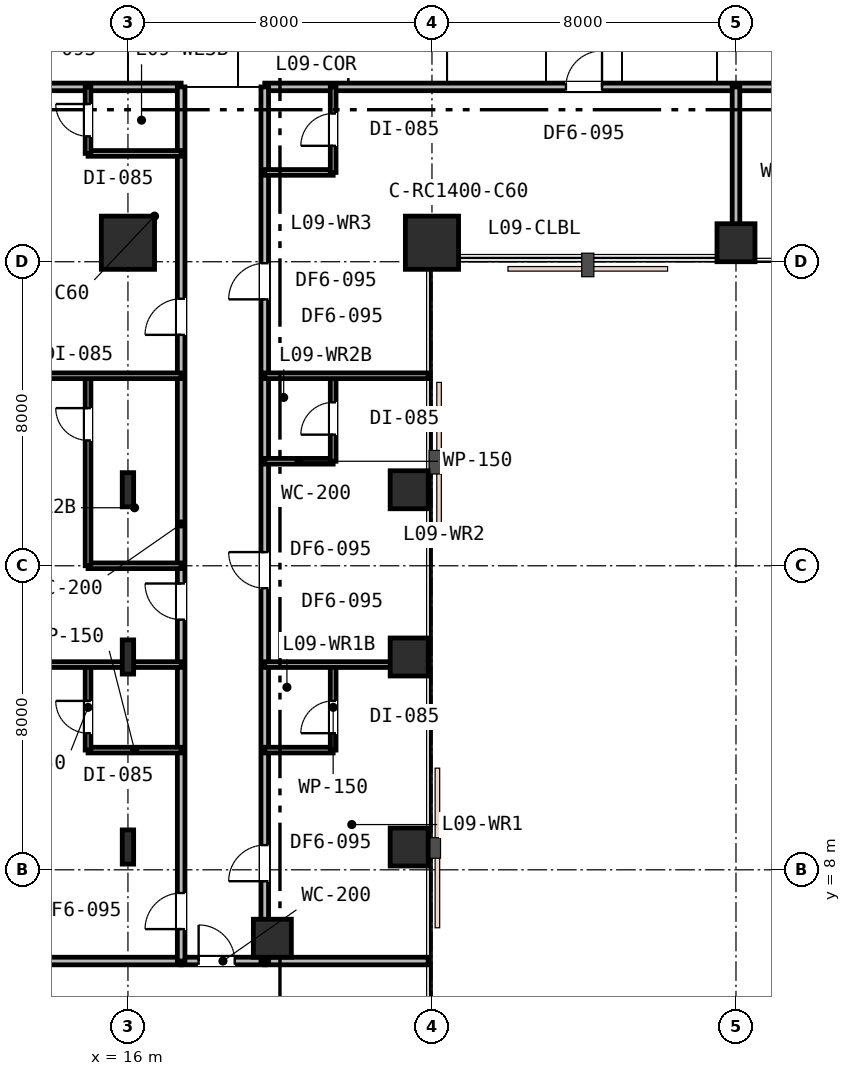
"""IFC4 building model, lengths in metres.
Left out: names, types, materials, properties, quantities, classifications, styles, units other than length and angle.
Written with IfcOpenShell. Run it as: python <this file> out.ifc"""

import sys

from ifc_helpers import new_model, si_unit, direction, frame, frame_2d, origin, origin_2d, place, context, subcontext, project, spatial, rectangle, i_section, extrude, element, fill, save


model = new_model("IFC4")
c1 = context("Model", 3, precision=1e-05, world=origin(), true_north=direction((0.0, 1.0)))
c2 = subcontext(c1, "Body", "Model", "MODEL_VIEW")
j1 = project(units=[si_unit("LENGTHUNIT", "METRE"), si_unit("PLANEANGLEUNIT", "RADIAN")], contexts=[c1])
p1 = place(None, origin())
s1 = spatial("IfcSite", under=j1, at=p1, CompositionType="ELEMENT")
p2 = place(p1, origin())
s2 = spatial("IfcBuilding", under=s1, at=p2, CompositionType="ELEMENT")
p3 = place(p2, frame((0.0, 0.0, 40.2)))
s3 = spatial("IfcBuildingStorey", under=s2, at=p3, CompositionType="ELEMENT", Elevation=40.2)
for number, where, z_axis, x_axis in (
    (1, (16.0, 24.5, 0.0), (0.0, 0.0, 1.0), (1.0, 0.0, 0.0)),
    (2, (24.0, 24.5, 0.0), (0.0, 0.0, 1.0), (1.0, 0.0, 0.0)),
):
    element("IfcColumn", number, at=place(p3, frame(where, z_axis=z_axis, x_axis=x_axis)), inside=s3, PredefinedType="COLUMN", context=c2, shape_type="SweptSolid", body=[
        extrude(rectangle(XDim=1.4, YDim=1.4, at=origin_2d()), origin(), (0.0, 0.0, 1.0), 3.6),
    ])
for number, where, z_axis, x_axis in (
    (3, (32.0, 24.5, 0.0), (0.0, 0.0, 1.0), (1.0, 0.0, 0.0)),
    (4, (19.8, 6.2, 0.0), (0.0, 0.0, 1.0), (1.0, 0.0, 0.0)),
    (5, (23.4, 8.6, 0.0), (0.0, 0.0, 1.0), (1.0, 0.0, 0.0)),
    (6, (23.4, 13.6, 0.0), (0.0, 0.0, 1.0), (1.0, 0.0, 0.0)),
    (7, (23.4, 18.0, 0.0), (0.0, 0.0, 1.0), (1.0, 0.0, 0.0)),
):
    element("IfcColumn", number, at=place(p3, frame(where, z_axis=z_axis, x_axis=x_axis)), inside=s3, PredefinedType="COLUMN", context=c2, shape_type="SweptSolid", body=[
        extrude(rectangle(XDim=1.0, YDim=1.0, at=origin_2d()), origin(), (0.0, 0.0, 1.0), 3.6),
    ])
for number, where, z_axis, x_axis in (
    (8, (16.0, 8.6, 0.0), (0.0, 0.0, 1.0), (1.0, 0.0, 0.0)),
    (9, (16.0, 13.6, 0.0), (0.0, 0.0, 1.0), (1.0, 0.0, 0.0)),
    (10, (16.0, 18.0, 0.0), (0.0, 0.0, 1.0), (1.0, 0.0, 0.0)),
):
    element("IfcColumn", number, at=place(p3, frame(where, z_axis=z_axis, x_axis=x_axis)), inside=s3, PredefinedType="COLUMN", context=c2, shape_type="SweptSolid", body=[
        extrude(i_section(OverallWidth=0.3, OverallDepth=0.9, WebThickness=0.018, FlangeThickness=0.035, FilletRadius=0.03, at=origin_2d()), origin(), (0.0, 0.0, 1.0), 3.6),
    ])
p4 = place(p3, frame((0.1, 28.6, 0.0), z_axis=(0.0, 0.0, 1.0), x_axis=(1.0, 0.0, 0.0)))
e11 = element("IfcWall", 11, at=p4, inside=s3, PredefinedType="PARTITIONING", context=c2, shape_type="SweptSolid", body=[
    extrude(rectangle(XDim=17.3, YDim=0.2, at=frame_2d((8.65, 0.0))), origin(), (0.0, 0.0, 1.0), 2.82),
])
p5 = place(p3, frame((19.6, 28.6, 0.0), z_axis=(0.0, 0.0, 1.0), x_axis=(1.0, 0.0, 0.0)))
e12 = element("IfcWall", 12, at=p5, inside=s3, PredefinedType="PARTITIONING", context=c2, shape_type="SweptSolid", body=[
    extrude(rectangle(XDim=30.8, YDim=0.2, at=frame_2d((15.4, 0.0))), origin(), (0.0, 0.0, 1.0), 2.82),
])
p6 = place(p5, frame((7.925, 0.0, 0.0)))
e13 = element("IfcOpeningElement", 13, at=p6, cuts=e12, PredefinedType="OPENING", context=c2, shape_type="SweptSolid", body=[
    extrude(rectangle(XDim=0.95, YDim=2.15, at=frame_2d((0.475, 1.075))), frame((0.0, 0.11, 0.0), z_axis=(0.0, -1.0, 0.0), x_axis=(1.0, 0.0, 0.0)), (0.0, 0.0, 1.0), 0.22),
])
p7 = place(p5, frame((16.39, 0.0, 0.0)))
e14 = element("IfcOpeningElement", 14, at=p7, cuts=e12, PredefinedType="OPENING", context=c2, shape_type="SweptSolid", body=[
    extrude(rectangle(XDim=0.95, YDim=2.15, at=frame_2d((0.475, 1.075))), frame((0.0, 0.11, 0.0), z_axis=(0.0, -1.0, 0.0), x_axis=(1.0, 0.0, 0.0)), (0.0, 0.0, 1.0), 0.22),
])
p8 = place(p5, frame((26.835, 0.0, 0.0)))
e15 = element("IfcOpeningElement", 15, at=p8, cuts=e12, PredefinedType="OPENING", context=c2, shape_type="SweptSolid", body=[
    extrude(rectangle(XDim=0.95, YDim=2.15, at=frame_2d((0.475, 1.075))), frame((0.0, 0.11, 0.0), z_axis=(0.0, -1.0, 0.0), x_axis=(1.0, 0.0, 0.0)), (0.0, 0.0, 1.0), 0.22),
])
p9 = place(p3, frame((32.0, 24.1, 0.0), z_axis=(0.0, 0.0, 1.0), x_axis=(0.0, 1.0, 0.0)))
e16 = element("IfcWall", 16, at=p9, inside=s3, PredefinedType="PARTITIONING", context=c2, shape_type="SweptSolid", body=[
    extrude(rectangle(XDim=4.5, YDim=0.2, at=frame_2d((2.25, 0.0))), origin(), (0.0, 0.0, 1.0), 2.93),
])
p10 = place(p3, frame((0.1, 5.6, 0.0), z_axis=(0.0, 0.0, 1.0), x_axis=(1.0, 0.0, 0.0)))
e17 = element("IfcWall", 17, at=p10, inside=s3, PredefinedType="PARTITIONING", context=c2, shape_type="SweptSolid", body=[
    extrude(rectangle(XDim=17.3, YDim=0.2, at=frame_2d((8.65, 0.0))), origin(), (0.0, 0.0, 1.0), 2.82),
])
p11 = place(p3, frame((19.6, 5.6, 0.0), z_axis=(0.0, 0.0, 1.0), x_axis=(1.0, 0.0, 0.0)))
e18 = element("IfcWall", 18, at=p11, inside=s3, PredefinedType="PARTITIONING", context=c2, shape_type="SweptSolid", body=[
    extrude(rectangle(XDim=4.3, YDim=0.2, at=frame_2d((2.15, 0.0))), origin(), (0.0, 0.0, 1.0), 3.33),
])
p12 = place(p3, frame((17.4, 5.6, 0.0), z_axis=(0.0, 0.0, 1.0), x_axis=(1.0, 0.0, 0.0)))
e19 = element("IfcWall", 19, at=p12, inside=s3, PredefinedType="PARTITIONING", context=c2, shape_type="SweptSolid", body=[
    extrude(rectangle(XDim=2.2, YDim=0.2, at=frame_2d((1.1, 0.0))), origin(), (0.0, 0.0, 1.0), 3.33),
])
p13 = place(p12, frame((0.46, 0.0, 0.0)))
e20 = element("IfcOpeningElement", 20, at=p13, cuts=e19, PredefinedType="OPENING", context=c2, shape_type="SweptSolid", body=[
    extrude(rectangle(XDim=0.95, YDim=2.15, at=frame_2d((0.475, 1.075))), frame((0.0, 0.11, 0.0), z_axis=(0.0, -1.0, 0.0), x_axis=(1.0, 0.0, 0.0)), (0.0, 0.0, 1.0), 0.22),
])
p14 = place(p3, frame((17.4, 5.6, 0.0), z_axis=(0.0, 0.0, 1.0), x_axis=(0.0, 1.0, 0.0)))
e21 = element("IfcWall", 21, at=p14, inside=s3, PredefinedType="PARTITIONING", context=c2, shape_type="SweptSolid", body=[
    extrude(rectangle(XDim=23.0, YDim=0.2, at=frame_2d((11.5, 0.0))), origin(), (0.0, 0.0, 1.0), 2.82),
])
p15 = place(p14, frame((0.84, 0.0, 0.0)))
e22 = element("IfcOpeningElement", 22, at=p15, cuts=e21, PredefinedType="OPENING", context=c2, shape_type="SweptSolid", body=[
    extrude(rectangle(XDim=0.95, YDim=2.15, at=frame_2d((0.475, 1.075))), frame((0.0, 0.11, 0.0), z_axis=(0.0, -1.0, 0.0), x_axis=(1.0, 0.0, 0.0)), (0.0, 0.0, 1.0), 0.22),
])
p16 = place(p14, frame((8.983, 0.0, 0.0)))
e23 = element("IfcOpeningElement", 23, at=p16, cuts=e21, PredefinedType="OPENING", context=c2, shape_type="SweptSolid", body=[
    extrude(rectangle(XDim=0.95, YDim=2.15, at=frame_2d((0.475, 1.075))), frame((0.0, 0.11, 0.0), z_axis=(0.0, -1.0, 0.0), x_axis=(1.0, 0.0, 0.0)), (0.0, 0.0, 1.0), 0.22),
])
p17 = place(p14, frame((16.476, 0.0, 0.0)))
e24 = element("IfcOpeningElement", 24, at=p17, cuts=e21, PredefinedType="OPENING", context=c2, shape_type="SweptSolid", body=[
    extrude(rectangle(XDim=0.95, YDim=2.15, at=frame_2d((0.475, 1.075))), frame((0.0, 0.11, 0.0), z_axis=(0.0, -1.0, 0.0), x_axis=(1.0, 0.0, 0.0)), (0.0, 0.0, 1.0), 0.22),
])
p18 = place(p3, frame((14.95, 11.15, 0.0), z_axis=(0.0, 0.0, 1.0), x_axis=(1.0, 0.0, 0.0)))
e25 = element("IfcWall", 25, at=p18, inside=s3, PredefinedType="PARTITIONING", context=c2, shape_type="SweptSolid", body=[
    extrude(rectangle(XDim=2.45, YDim=0.15, at=frame_2d((1.225, 0.0))), origin(), (0.0, 0.0, 1.0), 2.82),
])
p19 = place(p3, frame((14.95, 11.15, 0.0), z_axis=(0.0, 0.0, 1.0), x_axis=(0.0, 1.0, 0.0)))
e26 = element("IfcWall", 26, at=p19, inside=s3, PredefinedType="PARTITIONING", context=c2, shape_type="SweptSolid", body=[
    extrude(rectangle(XDim=2.25, YDim=0.15, at=frame_2d((1.125, 0.0))), origin(), (0.0, 0.0, 1.0), 2.82),
])
p20 = place(p19, frame((0.444, 0.0, 0.0)))
e27 = element("IfcOpeningElement", 27, at=p20, cuts=e26, PredefinedType="OPENING", context=c2, shape_type="SweptSolid", body=[
    extrude(rectangle(XDim=0.85, YDim=2.15, at=frame_2d((0.425, 1.075))), frame((0.0, 0.085, 0.0), z_axis=(0.0, -1.0, 0.0), x_axis=(1.0, 0.0, 0.0)), (0.0, 0.0, 1.0), 0.17),
])
p21 = place(p3, frame((0.1, 13.4, 0.0), z_axis=(0.0, 0.0, 1.0), x_axis=(1.0, 0.0, 0.0)))
e28 = element("IfcWall", 28, at=p21, inside=s3, PredefinedType="PARTITIONING", context=c2, shape_type="SweptSolid", body=[
    extrude(rectangle(XDim=17.3, YDim=0.15, at=frame_2d((8.65, 0.0))), origin(), (0.0, 0.0, 1.0), 2.82),
])
p22 = place(p3, frame((19.6, 5.6, 0.0), z_axis=(0.0, 0.0, 1.0), x_axis=(0.0, 1.0, 0.0)))
e29 = element("IfcWall", 29, at=p22, inside=s3, PredefinedType="PARTITIONING", context=c2, shape_type="SweptSolid", body=[
    extrude(rectangle(XDim=23.0, YDim=0.2, at=frame_2d((11.5, 0.0))), origin(), (0.0, 0.0, 1.0), 2.82),
])
p23 = place(p22, frame((2.1, 0.0, 0.0)))
e30 = element("IfcOpeningElement", 30, at=p23, cuts=e29, PredefinedType="OPENING", context=c2, shape_type="SweptSolid", body=[
    extrude(rectangle(XDim=0.95, YDim=2.15, at=frame_2d((0.475, 1.075))), frame((0.0, 0.11, 0.0), z_axis=(0.0, -1.0, 0.0), x_axis=(1.0, 0.0, 0.0)), (0.0, 0.0, 1.0), 0.22),
])
p24 = place(p22, frame((9.81, 0.0, 0.0)))
e31 = element("IfcOpeningElement", 31, at=p24, cuts=e29, PredefinedType="OPENING", context=c2, shape_type="SweptSolid", body=[
    extrude(rectangle(XDim=0.95, YDim=2.15, at=frame_2d((0.475, 1.075))), frame((0.0, 0.11, 0.0), z_axis=(0.0, -1.0, 0.0), x_axis=(1.0, 0.0, 0.0)), (0.0, 0.0, 1.0), 0.22),
])
p25 = place(p22, frame((17.41, 0.0, 0.0)))
e32 = element("IfcOpeningElement", 32, at=p25, cuts=e29, PredefinedType="OPENING", context=c2, shape_type="SweptSolid", body=[
    extrude(rectangle(XDim=0.95, YDim=2.15, at=frame_2d((0.475, 1.075))), frame((0.0, 0.11, 0.0), z_axis=(0.0, -1.0, 0.0), x_axis=(1.0, 0.0, 0.0)), (0.0, 0.0, 1.0), 0.22),
])
p26 = place(p3, frame((19.6, 11.15, 0.0), z_axis=(0.0, 0.0, 1.0), x_axis=(1.0, 0.0, 0.0)))
e33 = element("IfcWall", 33, at=p26, inside=s3, PredefinedType="PARTITIONING", context=c2, shape_type="SweptSolid", body=[
    extrude(rectangle(XDim=1.8, YDim=0.15, at=frame_2d((0.9, 0.0))), origin(), (0.0, 0.0, 1.0), 2.96),
])
p27 = place(p3, frame((21.4, 11.15, 0.0), z_axis=(0.0, 0.0, 1.0), x_axis=(0.0, 1.0, 0.0)))
e34 = element("IfcWall", 34, at=p27, inside=s3, PredefinedType="PARTITIONING", context=c2, shape_type="SweptSolid", body=[
    extrude(rectangle(XDim=2.25, YDim=0.15, at=frame_2d((1.125, 0.0))), origin(), (0.0, 0.0, 1.0), 2.82),
])
p28 = place(p27, frame((0.444, 0.0, 0.0)))
e35 = element("IfcOpeningElement", 35, at=p28, cuts=e34, PredefinedType="OPENING", context=c2, shape_type="SweptSolid", body=[
    extrude(rectangle(XDim=0.85, YDim=2.15, at=frame_2d((0.425, 1.075))), frame((0.0, 0.085, 0.0), z_axis=(0.0, -1.0, 0.0), x_axis=(1.0, 0.0, 0.0)), (0.0, 0.0, 1.0), 0.17),
])
p29 = place(p3, frame((19.6, 13.4, 0.0), z_axis=(0.0, 0.0, 1.0), x_axis=(1.0, 0.0, 0.0)))
e36 = element("IfcWall", 36, at=p29, inside=s3, PredefinedType="PARTITIONING", context=c2, shape_type="SweptSolid", body=[
    extrude(rectangle(XDim=4.3, YDim=0.15, at=frame_2d((2.15, 0.0))), origin(), (0.0, 0.0, 1.0), 2.82),
])
p30 = place(p3, frame((14.95, 16.0, 0.0), z_axis=(0.0, 0.0, 1.0), x_axis=(1.0, 0.0, 0.0)))
e37 = element("IfcWall", 37, at=p30, inside=s3, PredefinedType="PARTITIONING", context=c2, shape_type="SweptSolid", body=[
    extrude(rectangle(XDim=2.45, YDim=0.15, at=frame_2d((1.225, 0.0))), origin(), (0.0, 0.0, 1.0), 2.82),
])
p31 = place(p3, frame((14.95, 16.0, 0.0), z_axis=(0.0, 0.0, 1.0), x_axis=(0.0, 1.0, 0.0)))
e38 = element("IfcWall", 38, at=p31, inside=s3, PredefinedType="PARTITIONING", context=c2, shape_type="SweptSolid", body=[
    extrude(rectangle(XDim=5.0, YDim=0.15, at=frame_2d((2.5, 0.0))), origin(), (0.0, 0.0, 1.0), 2.82),
])
p32 = place(p31, frame((3.298, 0.0, 0.0)))
e39 = element("IfcOpeningElement", 39, at=p32, cuts=e38, PredefinedType="OPENING", context=c2, shape_type="SweptSolid", body=[
    extrude(rectangle(XDim=0.85, YDim=2.15, at=frame_2d((0.425, 1.075))), frame((0.0, 0.085, 0.0), z_axis=(0.0, -1.0, 0.0), x_axis=(1.0, 0.0, 0.0)), (0.0, 0.0, 1.0), 0.17),
])
p33 = place(p3, frame((0.1, 21.0, 0.0), z_axis=(0.0, 0.0, 1.0), x_axis=(1.0, 0.0, 0.0)))
e40 = element("IfcWall", 40, at=p33, inside=s3, PredefinedType="PARTITIONING", context=c2, shape_type="SweptSolid", body=[
    extrude(rectangle(XDim=17.3, YDim=0.15, at=frame_2d((8.65, 0.0))), origin(), (0.0, 0.0, 1.0), 2.82),
])
p34 = place(p3, frame((19.6, 18.75, 0.0), z_axis=(0.0, 0.0, 1.0), x_axis=(1.0, 0.0, 0.0)))
e41 = element("IfcWall", 41, at=p34, inside=s3, PredefinedType="PARTITIONING", context=c2, shape_type="SweptSolid", body=[
    extrude(rectangle(XDim=1.8, YDim=0.15, at=frame_2d((0.9, 0.0))), origin(), (0.0, 0.0, 1.0), 3.33),
])
p35 = place(p3, frame((21.4, 18.75, 0.0), z_axis=(0.0, 0.0, 1.0), x_axis=(0.0, 1.0, 0.0)))
e42 = element("IfcWall", 42, at=p35, inside=s3, PredefinedType="PARTITIONING", context=c2, shape_type="SweptSolid", body=[
    extrude(rectangle(XDim=2.25, YDim=0.15, at=frame_2d((1.125, 0.0))), origin(), (0.0, 0.0, 1.0), 3.33),
])
p36 = place(p35, frame((0.7, 0.0, 0.0)))
e43 = element("IfcOpeningElement", 43, at=p36, cuts=e42, PredefinedType="OPENING", context=c2, shape_type="SweptSolid", body=[
    extrude(rectangle(XDim=0.85, YDim=2.15, at=frame_2d((0.425, 1.075))), frame((0.0, 0.085, 0.0), z_axis=(0.0, -1.0, 0.0), x_axis=(1.0, 0.0, 0.0)), (0.0, 0.0, 1.0), 0.17),
])
p37 = place(p3, frame((19.6, 21.0, 0.0), z_axis=(0.0, 0.0, 1.0), x_axis=(1.0, 0.0, 0.0)))
e44 = element("IfcWall", 44, at=p37, inside=s3, PredefinedType="PARTITIONING", context=c2, shape_type="SweptSolid", body=[
    extrude(rectangle(XDim=4.3, YDim=0.15, at=frame_2d((2.15, 0.0))), origin(), (0.0, 0.0, 1.0), 3.33),
])
p38 = place(p3, frame((14.95, 26.85, 0.0), z_axis=(0.0, 0.0, 1.0), x_axis=(1.0, 0.0, 0.0)))
e45 = element("IfcWall", 45, at=p38, inside=s3, PredefinedType="PARTITIONING", context=c2, shape_type="SweptSolid", body=[
    extrude(rectangle(XDim=2.45, YDim=0.15, at=frame_2d((1.225, 0.0))), origin(), (0.0, 0.0, 1.0), 2.82),
])
p39 = place(p3, frame((14.95, 26.85, 0.0), z_axis=(0.0, 0.0, 1.0), x_axis=(0.0, 1.0, 0.0)))
e46 = element("IfcWall", 46, at=p39, inside=s3, PredefinedType="PARTITIONING", context=c2, shape_type="SweptSolid", body=[
    extrude(rectangle(XDim=1.75, YDim=0.15, at=frame_2d((0.875, 0.0))), origin(), (0.0, 0.0, 1.0), 3.33),
])
p40 = place(p39, frame((0.45, 0.0, 0.0)))
e47 = element("IfcOpeningElement", 47, at=p40, cuts=e46, PredefinedType="OPENING", context=c2, shape_type="SweptSolid", body=[
    extrude(rectangle(XDim=0.85, YDim=2.15, at=frame_2d((0.425, 1.075))), frame((0.0, 0.085, 0.0), z_axis=(0.0, -1.0, 0.0), x_axis=(1.0, 0.0, 0.0)), (0.0, 0.0, 1.0), 0.17),
])
p41 = place(p3, frame((19.6, 26.35, 0.0), z_axis=(0.0, 0.0, 1.0), x_axis=(1.0, 0.0, 0.0)))
e48 = element("IfcWall", 48, at=p41, inside=s3, PredefinedType="PARTITIONING", context=c2, shape_type="SweptSolid", body=[
    extrude(rectangle(XDim=1.8, YDim=0.15, at=frame_2d((0.9, 0.0))), origin(), (0.0, 0.0, 1.0), 2.96),
])
p42 = place(p3, frame((21.4, 26.35, 0.0), z_axis=(0.0, 0.0, 1.0), x_axis=(0.0, 1.0, 0.0)))
e49 = element("IfcWall", 49, at=p42, inside=s3, PredefinedType="PARTITIONING", context=c2, shape_type="SweptSolid", body=[
    extrude(rectangle(XDim=2.25, YDim=0.15, at=frame_2d((1.125, 0.0))), origin(), (0.0, 0.0, 1.0), 2.96),
])
p43 = place(p42, frame((0.7, 0.0, 0.0)))
e50 = element("IfcOpeningElement", 50, at=p43, cuts=e49, PredefinedType="OPENING", context=c2, shape_type="SweptSolid", body=[
    extrude(rectangle(XDim=0.85, YDim=2.15, at=frame_2d((0.425, 1.075))), frame((0.0, 0.085, 0.0), z_axis=(0.0, -1.0, 0.0), x_axis=(1.0, 0.0, 0.0)), (0.0, 0.0, 1.0), 0.17),
])
p44 = place(p6, origin())
e51 = element("IfcDoor", 51, at=p44, inside=s3, OperationType="SINGLE_SWING_RIGHT", PredefinedType="DOOR", context=c2, shape_type="SweptSolid", body=[
    extrude(rectangle(XDim=0.95, YDim=2.15, at=frame_2d((0.475, 1.075))), frame((0.0, 0.025, 0.0), z_axis=(0.0, -1.0, 0.0), x_axis=(1.0, 0.0, 0.0)), (0.0, 0.0, 1.0), 0.05),
])
fill(e13, e51)
p45 = place(p13, origin())
e52 = element("IfcDoor", 52, at=p45, inside=s3, OperationType="SINGLE_SWING_LEFT", PredefinedType="DOOR", context=c2, shape_type="SweptSolid", body=[
    extrude(rectangle(XDim=0.95, YDim=2.15, at=frame_2d((0.475, 1.075))), frame((0.0, 0.025, 0.0), z_axis=(0.0, -1.0, 0.0), x_axis=(1.0, 0.0, 0.0)), (0.0, 0.0, 1.0), 0.05),
])
fill(e20, e52)
p46 = place(p15, origin())
e53 = element("IfcDoor", 53, at=p46, inside=s3, OperationType="SINGLE_SWING_LEFT", PredefinedType="DOOR", context=c2, shape_type="SweptSolid", body=[
    extrude(rectangle(XDim=0.95, YDim=2.15, at=frame_2d((0.475, 1.075))), frame((0.0, 0.025, 0.0), z_axis=(0.0, -1.0, 0.0), x_axis=(1.0, 0.0, 0.0)), (0.0, 0.0, 1.0), 0.05),
])
fill(e22, e53)
p47 = place(p20, origin())
e54 = element("IfcDoor", 54, at=p47, inside=s3, OperationType="SINGLE_SWING_RIGHT", PredefinedType="DOOR", context=c2, shape_type="SweptSolid", body=[
    extrude(rectangle(XDim=0.85, YDim=2.15, at=frame_2d((0.425, 1.075))), frame((0.0, 0.025, 0.0), z_axis=(0.0, -1.0, 0.0), x_axis=(1.0, 0.0, 0.0)), (0.0, 0.0, 1.0), 0.05),
])
fill(e27, e54)
p48 = place(p23, origin())
e55 = element("IfcDoor", 55, at=p48, inside=s3, OperationType="SINGLE_SWING_LEFT", PredefinedType="DOOR", context=c2, shape_type="SweptSolid", body=[
    extrude(rectangle(XDim=0.95, YDim=2.15, at=frame_2d((0.475, 1.075))), frame((0.0, 0.025, 0.0), z_axis=(0.0, -1.0, 0.0), x_axis=(1.0, 0.0, 0.0)), (0.0, 0.0, 1.0), 0.05),
])
fill(e30, e55)
p49 = place(p28, origin())
e56 = element("IfcDoor", 56, at=p49, inside=s3, OperationType="SINGLE_SWING_LEFT", PredefinedType="DOOR", context=c2, shape_type="SweptSolid", body=[
    extrude(rectangle(XDim=0.85, YDim=2.15, at=frame_2d((0.425, 1.075))), frame((0.0, 0.025, 0.0), z_axis=(0.0, -1.0, 0.0), x_axis=(1.0, 0.0, 0.0)), (0.0, 0.0, 1.0), 0.05),
])
fill(e35, e56)
p50 = place(p16, origin())
e57 = element("IfcDoor", 57, at=p50, inside=s3, OperationType="SINGLE_SWING_RIGHT", PredefinedType="DOOR", context=c2, shape_type="SweptSolid", body=[
    extrude(rectangle(XDim=0.95, YDim=2.15, at=frame_2d((0.475, 1.075))), frame((0.0, 0.025, 0.0), z_axis=(0.0, -1.0, 0.0), x_axis=(1.0, 0.0, 0.0)), (0.0, 0.0, 1.0), 0.05),
])
fill(e23, e57)
p51 = place(p32, origin())
e58 = element("IfcDoor", 58, at=p51, inside=s3, OperationType="SINGLE_SWING_RIGHT", PredefinedType="DOOR", context=c2, shape_type="SweptSolid", body=[
    extrude(rectangle(XDim=0.85, YDim=2.15, at=frame_2d((0.425, 1.075))), frame((0.0, 0.025, 0.0), z_axis=(0.0, -1.0, 0.0), x_axis=(1.0, 0.0, 0.0)), (0.0, 0.0, 1.0), 0.05),
])
fill(e39, e58)
p52 = place(p24, origin())
e59 = element("IfcDoor", 59, at=p52, inside=s3, OperationType="SINGLE_SWING_RIGHT", PredefinedType="DOOR", context=c2, shape_type="SweptSolid", body=[
    extrude(rectangle(XDim=0.95, YDim=2.15, at=frame_2d((0.475, 1.075))), frame((0.0, 0.025, 0.0), z_axis=(0.0, -1.0, 0.0), x_axis=(1.0, 0.0, 0.0)), (0.0, 0.0, 1.0), 0.05),
])
fill(e31, e59)
p53 = place(p36, origin())
e60 = element("IfcDoor", 60, at=p53, inside=s3, OperationType="SINGLE_SWING_LEFT", PredefinedType="DOOR", context=c2, shape_type="SweptSolid", body=[
    extrude(rectangle(XDim=0.85, YDim=2.15, at=frame_2d((0.425, 1.075))), frame((0.0, 0.025, 0.0), z_axis=(0.0, -1.0, 0.0), x_axis=(1.0, 0.0, 0.0)), (0.0, 0.0, 1.0), 0.05),
])
fill(e43, e60)
p54 = place(p17, origin())
e61 = element("IfcDoor", 61, at=p54, inside=s3, OperationType="SINGLE_SWING_LEFT", PredefinedType="DOOR", context=c2, shape_type="SweptSolid", body=[
    extrude(rectangle(XDim=0.95, YDim=2.15, at=frame_2d((0.475, 1.075))), frame((0.0, 0.025, 0.0), z_axis=(0.0, -1.0, 0.0), x_axis=(1.0, 0.0, 0.0)), (0.0, 0.0, 1.0), 0.05),
])
fill(e24, e61)
p55 = place(p40, origin())
e62 = element("IfcDoor", 62, at=p55, inside=s3, OperationType="SINGLE_SWING_RIGHT", PredefinedType="DOOR", context=c2, shape_type="SweptSolid", body=[
    extrude(rectangle(XDim=0.85, YDim=2.15, at=frame_2d((0.425, 1.075))), frame((0.0, 0.025, 0.0), z_axis=(0.0, -1.0, 0.0), x_axis=(1.0, 0.0, 0.0)), (0.0, 0.0, 1.0), 0.05),
])
fill(e47, e62)
p56 = place(p25, origin())
e63 = element("IfcDoor", 63, at=p56, inside=s3, OperationType="SINGLE_SWING_LEFT", PredefinedType="DOOR", context=c2, shape_type="SweptSolid", body=[
    extrude(rectangle(XDim=0.95, YDim=2.15, at=frame_2d((0.475, 1.075))), frame((0.0, 0.025, 0.0), z_axis=(0.0, -1.0, 0.0), x_axis=(1.0, 0.0, 0.0)), (0.0, 0.0, 1.0), 0.05),
])
fill(e32, e63)
p57 = place(p43, origin())
e64 = element("IfcDoor", 64, at=p57, inside=s3, OperationType="SINGLE_SWING_LEFT", PredefinedType="DOOR", context=c2, shape_type="SweptSolid", body=[
    extrude(rectangle(XDim=0.85, YDim=2.15, at=frame_2d((0.425, 1.075))), frame((0.0, 0.025, 0.0), z_axis=(0.0, -1.0, 0.0), x_axis=(1.0, 0.0, 0.0)), (0.0, 0.0, 1.0), 0.05),
])
fill(e50, e64)
save(model, sys.argv[1])
